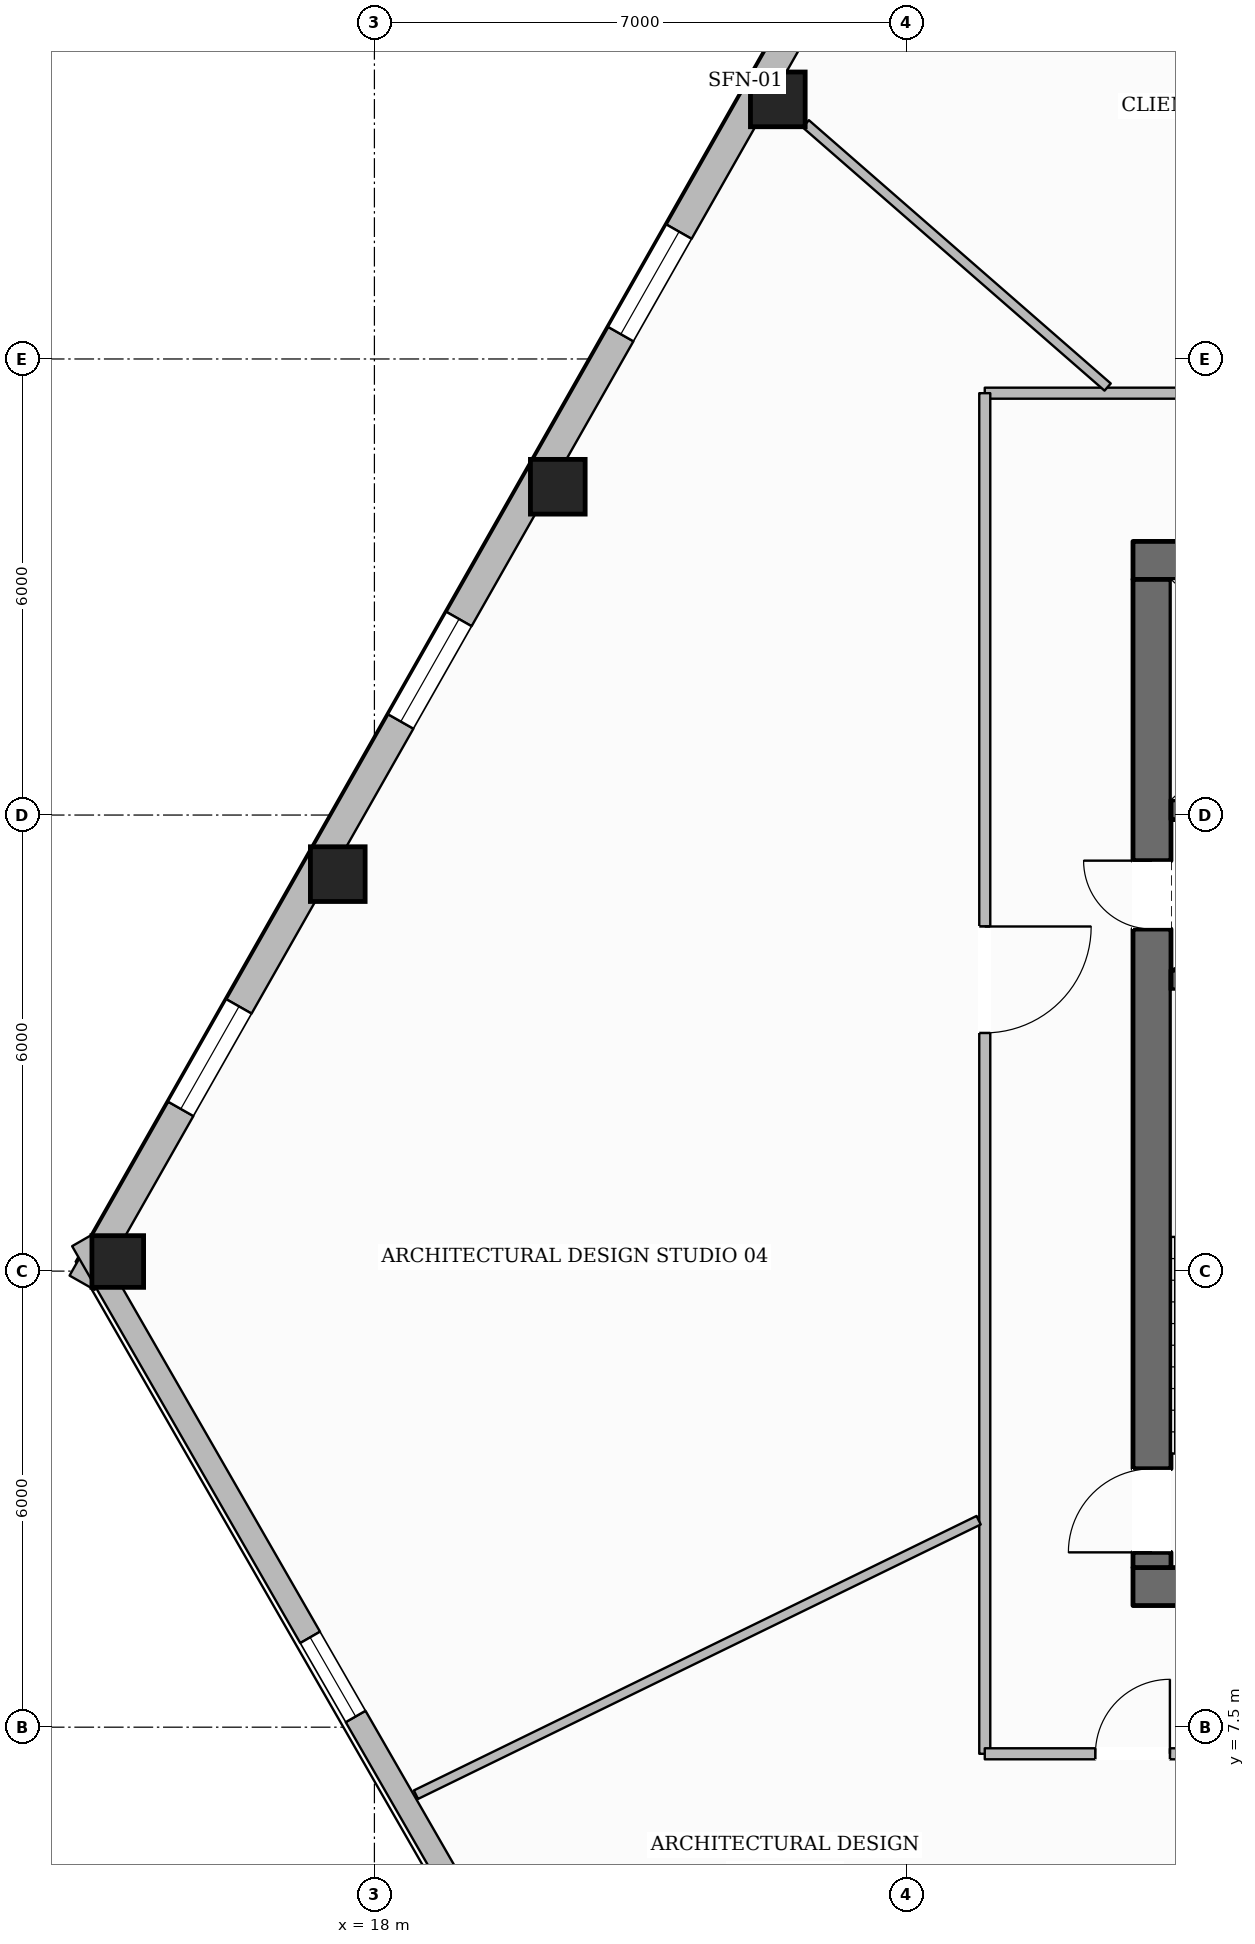
"""IFC4 building model, lengths in metres.
Left out: names, types, materials, properties, quantities, classifications, styles, units other than length and angle.
Written with IfcOpenShell. Run it as: python <this file> out.ifc"""

import sys

from ifc_helpers import new_model, si_unit, direction, frame, frame_2d, origin, origin_2d, place, context, subcontext, project, spatial, rectangle, hollow_rectangle, extrude, element, fill, save


model = new_model("IFC4")
c1 = context("Model", 3, precision=1e-05, world=origin(), true_north=direction((0.0, 1.0)))
c2 = subcontext(c1, "Body", "Model", "MODEL_VIEW")
j1 = project(units=[si_unit("LENGTHUNIT", "METRE"), si_unit("PLANEANGLEUNIT", "RADIAN")], contexts=[c1])
p1 = place(None, origin())
s1 = spatial("IfcSite", under=j1, at=p1, CompositionType="ELEMENT")
p2 = place(p1, origin())
s2 = spatial("IfcBuilding", under=s1, at=p2, CompositionType="ELEMENT")
p3 = place(p2, frame((0.0, 0.0, 104.75)))
s3 = spatial("IfcBuildingStorey", under=s2, at=p3, CompositionType="ELEMENT", Elevation=104.75)
p4 = place(p3, frame((27.98, 9.35, 0.0), z_axis=(0.0, 0.0, 1.0), x_axis=(1.0, 0.0, 0.0)))
e1 = element("IfcWall", 1, at=p4, inside=s3, PredefinedType="SOLIDWALL", context=c2, shape_type="SweptSolid", body=[
    extrude(rectangle(XDim=20.04, YDim=0.5, at=frame_2d((10.02, 0.0))), origin(), (0.0, 0.0, 1.0), 3.6),
])
p5 = place(p4, frame((10.52, 0.0, 0.0)))
e2 = element("IfcOpeningElement", 2, at=p5, cuts=e1, PredefinedType="OPENING", context=c2, shape_type="SweptSolid", body=[
    extrude(rectangle(XDim=1.4, YDim=2.2, at=frame_2d((0.7, 1.1))), frame((0.0, 0.26, 0.0), z_axis=(0.0, -1.0, 0.0), x_axis=(1.0, 0.0, 0.0)), (0.0, 0.0, 1.0), 0.52),
])
p6 = place(p3, frame((27.98, 22.85, 0.0), z_axis=(0.0, 0.0, 1.0), x_axis=(1.0, 0.0, 0.0)))
e3 = element("IfcWall", 3, at=p6, inside=s3, PredefinedType="SOLIDWALL", context=c2, shape_type="SweptSolid", body=[
    extrude(rectangle(XDim=20.04, YDim=0.5, at=frame_2d((10.02, 0.0))), origin(), (0.0, 0.0, 1.0), 3.6),
])
p7 = place(p6, frame((6.295, 0.0, 0.0)))
e4 = element("IfcOpeningElement", 4, at=p7, cuts=e3, PredefinedType="OPENING", context=c2, shape_type="SweptSolid", body=[
    extrude(rectangle(XDim=1.05, YDim=2.15, at=frame_2d((0.525, 1.075))), frame((0.0, 0.26, 0.0), z_axis=(0.0, -1.0, 0.0), x_axis=(1.0, 0.0, 0.0)), (0.0, 0.0, 1.0), 0.52),
])
p8 = place(p6, frame((12.695, 0.0, 0.0)))
e5 = element("IfcOpeningElement", 5, at=p8, cuts=e3, PredefinedType="OPENING", context=c2, shape_type="SweptSolid", body=[
    extrude(rectangle(XDim=1.05, YDim=2.15, at=frame_2d((0.525, 1.075))), frame((0.0, 0.26, 0.0), z_axis=(0.0, -1.0, 0.0), x_axis=(1.0, 0.0, 0.0)), (0.0, 0.0, 1.0), 0.52),
])
p9 = place(p3, frame((28.23, 9.6, 0.0), z_axis=(0.0, 0.0, 1.0), x_axis=(0.0, 1.0, 0.0)))
e6 = element("IfcWall", 6, at=p9, inside=s3, PredefinedType="SOLIDWALL", context=c2, shape_type="SweptSolid", body=[
    extrude(rectangle(XDim=13.0, YDim=0.5, at=frame_2d((6.5, 0.0))), origin(), (0.0, 0.0, 1.0), 3.6),
])
p10 = place(p9, frame((0.2, 0.0, 0.0)))
e7 = element("IfcOpeningElement", 7, at=p10, cuts=e6, PredefinedType="OPENING", context=c2, shape_type="SweptSolid", body=[
    extrude(rectangle(XDim=1.1, YDim=2.15, at=frame_2d((0.55, 1.075))), frame((0.0, 0.26, 0.0), z_axis=(0.0, -1.0, 0.0), x_axis=(1.0, 0.0, 0.0)), (0.0, 0.0, 1.0), 0.52),
])
p11 = place(p9, frame((8.4, 0.0, 0.0)))
e8 = element("IfcOpeningElement", 8, at=p11, cuts=e6, PredefinedType="OPENING", context=c2, shape_type="SweptSolid", body=[
    extrude(rectangle(XDim=0.9, YDim=2.1, at=frame_2d((0.45, 1.05))), frame((0.0, 0.26, 0.0), z_axis=(0.0, -1.0, 0.0), x_axis=(1.0, 0.0, 0.0)), (0.0, 0.0, 1.0), 0.52),
])
for number, where, z_axis, x_axis in (
    (9, (28.48, 17.33, 0.0), (0.0, 0.0, 1.0), (1.0, 0.0, 0.0)),
    (10, (28.48, 19.57, 0.0), (0.0, 0.0, 1.0), (1.0, 0.0, 0.0)),
):
    element("IfcWall", number, at=place(p3, frame(where, z_axis=z_axis, x_axis=x_axis)), inside=s3, PredefinedType="SHEAR", context=c2, shape_type="SweptSolid", body=[
        extrude(rectangle(XDim=3.2, YDim=0.26, at=frame_2d((1.6, 0.0))), origin(), (0.0, 0.0, 1.0), 3.6),
    ])
for number, where, z_axis, x_axis in (
    (11, (23.307, 28.915, 0.0), (0.0, 0.0, 1.0), (1.0, 0.0, 0.0)),
    (12, (20.413, 23.819, 0.0), (0.0, 0.0, 1.0), (1.0, 0.0, 0.0)),
    (13, (17.518, 18.723, 0.0), (0.0, 0.0, 1.0), (1.0, 0.0, 0.0)),
):
    element("IfcColumn", number, at=place(p3, frame(where, z_axis=z_axis, x_axis=x_axis)), inside=s3, PredefinedType="COLUMN", context=c2, shape_type="SweptSolid", body=[
        extrude(hollow_rectangle(XDim=0.72, YDim=0.72, WallThickness=0.032, at=origin_2d()), origin(), (0.0, 0.0, 1.0), 3.6),
    ])
p12 = place(p3, frame((14.624, 13.626, 0.0), z_axis=(0.0, 0.0, 1.0), x_axis=(1.0, 0.0, 0.0)))
e14 = element("IfcColumn", 14, at=p12, inside=s3, PredefinedType="COLUMN", context=c2, shape_type="SweptSolid", body=[
    extrude(hollow_rectangle(XDim=0.68, YDim=0.68, WallThickness=0.03, at=origin_2d()), origin(), (0.0, 0.0, 1.0), 3.6),
])
p13 = place(p3, frame((14.155, 13.347, 0.0), z_axis=(0.0, 0.0, 1.0), x_axis=(0.493868426836, 0.869536644986, 0.0)))
e15 = element("IfcWall", 15, at=p13, inside=s3, PredefinedType="STANDARD", context=c2, shape_type="SweptSolid", body=[
    extrude(rectangle(XDim=36.121, YDim=0.38, at=frame_2d((18.061, 0.0))), origin(), (0.0, 0.0, 1.0), 3.059),
])
p14 = place(p13, frame((31.935, 0.0, 0.65)))
e16 = element("IfcOpeningElement", 16, at=p14, cuts=e15, PredefinedType="OPENING", context=c2, shape_type="SweptSolid", body=[
    extrude(rectangle(XDim=1.55, YDim=1.75, at=frame_2d((0.775, 0.875))), frame((0.0, 0.2, 0.0), z_axis=(0.0, -1.0, 0.0), x_axis=(1.0, 0.0, 0.0)), (0.0, 0.0, 1.0), 0.4),
])
p15 = place(p13, frame((26.073, 0.0, 0.65)))
e17 = element("IfcOpeningElement", 17, at=p15, cuts=e15, PredefinedType="OPENING", context=c2, shape_type="SweptSolid", body=[
    extrude(rectangle(XDim=1.55, YDim=1.75, at=frame_2d((0.775, 0.875))), frame((0.0, 0.2, 0.0), z_axis=(0.0, -1.0, 0.0), x_axis=(1.0, 0.0, 0.0)), (0.0, 0.0, 1.0), 0.4),
])
p16 = place(p13, frame((14.352, 0.0, 0.65)))
e18 = element("IfcOpeningElement", 18, at=p16, cuts=e15, PredefinedType="OPENING", context=c2, shape_type="SweptSolid", body=[
    extrude(rectangle(XDim=1.55, YDim=1.75, at=frame_2d((0.775, 0.875))), frame((0.0, 0.2, 0.0), z_axis=(0.0, -1.0, 0.0), x_axis=(1.0, 0.0, 0.0)), (0.0, 0.0, 1.0), 0.4),
])
p17 = place(p13, frame((8.491, 0.0, 0.65)))
e19 = element("IfcOpeningElement", 19, at=p17, cuts=e15, PredefinedType="OPENING", context=c2, shape_type="SweptSolid", body=[
    extrude(rectangle(XDim=1.55, YDim=1.75, at=frame_2d((0.775, 0.875))), frame((0.0, 0.2, 0.0), z_axis=(0.0, -1.0, 0.0), x_axis=(1.0, 0.0, 0.0)), (0.0, 0.0, 1.0), 0.4),
])
p18 = place(p13, frame((2.63, 0.0, 0.65)))
e20 = element("IfcOpeningElement", 20, at=p18, cuts=e15, PredefinedType="OPENING", context=c2, shape_type="SweptSolid", body=[
    extrude(rectangle(XDim=1.55, YDim=1.75, at=frame_2d((0.775, 0.875))), frame((0.0, 0.2, 0.0), z_axis=(0.0, -1.0, 0.0), x_axis=(1.0, 0.0, 0.0)), (0.0, 0.0, 1.0), 0.4),
])
p19 = place(p3, frame((20.754, 2.419, 0.0), z_axis=(0.0, 0.0, 1.0), x_axis=(-0.49837034912, 0.866964240969, 0.0)))
e21 = element("IfcWall", 21, at=p19, inside=s3, PredefinedType="STANDARD", context=c2, shape_type="SweptSolid", body=[
    extrude(rectangle(XDim=13.246, YDim=0.3, at=frame_2d((6.623, 0.0))), origin(), (0.0, 0.0, 1.0), 3.059),
])
p20 = place(p19, frame((6.023, 0.0, 0.65)))
e22 = element("IfcOpeningElement", 22, at=p20, cuts=e21, PredefinedType="OPENING", context=c2, shape_type="SweptSolid", body=[
    extrude(rectangle(XDim=1.2, YDim=1.7, at=frame_2d((0.6, 0.85))), frame((0.0, 0.16, 0.0), z_axis=(0.0, -1.0, 0.0), x_axis=(1.0, 0.0, 0.0)), (0.0, 0.0, 1.0), 0.32),
])
p21 = place(p3, frame((49.97, 25.05, 0.0), z_axis=(0.0, 0.0, 1.0), x_axis=(-1.0, 0.0, 0.0)))
e23 = element("IfcWall", 23, at=p21, inside=s3, PredefinedType="PARTITIONING", context=c2, shape_type="SweptSolid", body=[
    extrude(rectangle(XDim=23.94, YDim=0.145, at=frame_2d((11.97, 0.0))), origin(), (0.0, 0.0, 1.0), 3.6),
])
p22 = place(p21, frame((5.824, 0.0, 0.0)))
e24 = element("IfcOpeningElement", 24, at=p22, cuts=e23, PredefinedType="OPENING", context=c2, shape_type="SweptSolid", body=[
    extrude(rectangle(XDim=1.4, YDim=2.2, at=frame_2d((0.7, 1.1))), frame((0.0, 0.083, 0.0), z_axis=(0.0, -1.0, 0.0), x_axis=(1.0, 0.0, 0.0)), (0.0, 0.0, 1.0), 0.165),
])
p23 = place(p21, frame((16.238, 0.0, 0.0)))
e25 = element("IfcOpeningElement", 25, at=p23, cuts=e23, PredefinedType="OPENING", context=c2, shape_type="SweptSolid", body=[
    extrude(rectangle(XDim=1.4, YDim=2.2, at=frame_2d((0.7, 1.1))), frame((0.0, 0.083, 0.0), z_axis=(0.0, -1.0, 0.0), x_axis=(1.0, 0.0, 0.0)), (0.0, 0.0, 1.0), 0.165),
])
p24 = place(p3, frame((26.03, 25.05, 0.0), z_axis=(0.0, 0.0, 1.0), x_axis=(0.0, -1.0, 0.0)))
e26 = element("IfcWall", 26, at=p24, inside=s3, PredefinedType="PARTITIONING", context=c2, shape_type="SweptSolid", body=[
    extrude(rectangle(XDim=17.9, YDim=0.145, at=frame_2d((8.95, 0.0))), origin(), (0.0, 0.0, 1.0), 3.288),
])
p25 = place(p24, frame((7.016, 0.0, 0.0)))
e27 = element("IfcOpeningElement", 27, at=p25, cuts=e26, PredefinedType="OPENING", context=c2, shape_type="SweptSolid", body=[
    extrude(rectangle(XDim=1.4, YDim=2.2, at=frame_2d((0.7, 1.1))), frame((0.0, 0.083, 0.0), z_axis=(0.0, -1.0, 0.0), x_axis=(1.0, 0.0, 0.0)), (0.0, 0.0, 1.0), 0.165),
])
p26 = place(p3, frame((26.03, 7.15, 0.0), z_axis=(0.0, 0.0, 1.0), x_axis=(1.0, 0.0, 0.0)))
e28 = element("IfcWall", 28, at=p26, inside=s3, PredefinedType="PARTITIONING", context=c2, shape_type="SweptSolid", body=[
    extrude(rectangle(XDim=23.94, YDim=0.145, at=frame_2d((11.97, 0.0))), origin(), (0.0, 0.0, 1.0), 3.6),
])
p27 = place(p26, frame((4.53, 0.0, 0.0)))
e29 = element("IfcOpeningElement", 29, at=p27, cuts=e28, PredefinedType="OPENING", context=c2, shape_type="SweptSolid", body=[
    extrude(rectangle(XDim=0.88, YDim=2.1, at=frame_2d((0.44, 1.05))), frame((0.0, 0.083, 0.0), z_axis=(0.0, -1.0, 0.0), x_axis=(1.0, 0.0, 0.0)), (0.0, 0.0, 1.0), 0.165),
])
p28 = place(p26, frame((7.05, 0.0, 0.0)))
e30 = element("IfcOpeningElement", 30, at=p28, cuts=e28, PredefinedType="OPENING", context=c2, shape_type="SweptSolid", body=[
    extrude(rectangle(XDim=0.88, YDim=2.1, at=frame_2d((0.44, 1.05))), frame((0.0, 0.083, 0.0), z_axis=(0.0, -1.0, 0.0), x_axis=(1.0, 0.0, 0.0)), (0.0, 0.0, 1.0), 0.165),
])
p29 = place(p26, frame((9.43, 0.0, 0.0)))
e31 = element("IfcOpeningElement", 31, at=p29, cuts=e28, PredefinedType="OPENING", context=c2, shape_type="SweptSolid", body=[
    extrude(rectangle(XDim=0.96, YDim=2.1, at=frame_2d((0.48, 1.05))), frame((0.0, 0.083, 0.0), z_axis=(0.0, -1.0, 0.0), x_axis=(1.0, 0.0, 0.0)), (0.0, 0.0, 1.0), 0.165),
])
p30 = place(p26, frame((1.456, 0.0, 0.0)))
e32 = element("IfcOpeningElement", 32, at=p30, cuts=e28, PredefinedType="OPENING", context=c2, shape_type="SweptSolid", body=[
    extrude(rectangle(XDim=0.98, YDim=2.15, at=frame_2d((0.49, 1.075))), frame((0.0, 0.083, 0.0), z_axis=(0.0, -1.0, 0.0), x_axis=(1.0, 0.0, 0.0)), (0.0, 0.0, 1.0), 0.165),
])
p31 = place(p26, frame((16.714, 0.0, 0.0)))
e33 = element("IfcOpeningElement", 33, at=p31, cuts=e28, PredefinedType="OPENING", context=c2, shape_type="SweptSolid", body=[
    extrude(rectangle(XDim=1.4, YDim=2.2, at=frame_2d((0.7, 1.1))), frame((0.0, 0.083, 0.0), z_axis=(0.0, -1.0, 0.0), x_axis=(1.0, 0.0, 0.0)), (0.0, 0.0, 1.0), 0.165),
])
p32 = place(p3, frame((27.646, 25.131, 0.0), z_axis=(0.0, 0.0, 1.0), x_axis=(-0.753603237889, 0.657329567145, 0.0)))
e34 = element("IfcWall", 34, at=p32, inside=s3, PredefinedType="PARTITIONING", context=c2, shape_type="SweptSolid", body=[
    extrude(rectangle(XDim=5.27, YDim=0.125, at=frame_2d((2.635, 0.0))), origin(), (0.0, 0.0, 1.0), 3.141),
])
p33 = place(p3, frame((25.949, 10.223, 0.0), z_axis=(0.0, 0.0, 1.0), x_axis=(-0.898788385453, -0.438382753054, 0.0)))
e35 = element("IfcWall", 35, at=p33, inside=s3, PredefinedType="PARTITIONING", context=c2, shape_type="SweptSolid", body=[
    extrude(rectangle(XDim=8.237, YDim=0.125, at=frame_2d((4.118, 0.0))), origin(), (0.0, 0.0, 1.0), 3.6),
])
p34 = place(p16, origin())
e36 = element("IfcWindow", 36, at=p34, inside=s3, PartitioningType="SINGLE_PANEL", PredefinedType="WINDOW", context=c2, shape_type="SweptSolid", body=[
    extrude(rectangle(XDim=1.55, YDim=1.75, at=frame_2d((0.775, 0.875))), frame((0.0, 0.03, 0.0), z_axis=(0.0, -1.0, 0.0), x_axis=(1.0, 0.0, 0.0)), (0.0, 0.0, 1.0), 0.06),
])
fill(e18, e36)
p35 = place(p17, origin())
e37 = element("IfcWindow", 37, at=p35, inside=s3, PartitioningType="SINGLE_PANEL", PredefinedType="WINDOW", context=c2, shape_type="SweptSolid", body=[
    extrude(rectangle(XDim=1.55, YDim=1.75, at=frame_2d((0.775, 0.875))), frame((0.0, 0.03, 0.0), z_axis=(0.0, -1.0, 0.0), x_axis=(1.0, 0.0, 0.0)), (0.0, 0.0, 1.0), 0.06),
])
fill(e19, e37)
p36 = place(p18, origin())
e38 = element("IfcWindow", 38, at=p36, inside=s3, PartitioningType="SINGLE_PANEL", PredefinedType="WINDOW", context=c2, shape_type="SweptSolid", body=[
    extrude(rectangle(XDim=1.55, YDim=1.75, at=frame_2d((0.775, 0.875))), frame((0.0, 0.03, 0.0), z_axis=(0.0, -1.0, 0.0), x_axis=(1.0, 0.0, 0.0)), (0.0, 0.0, 1.0), 0.06),
])
fill(e20, e38)
p37 = place(p20, origin())
e39 = element("IfcWindow", 39, at=p37, inside=s3, PartitioningType="SINGLE_PANEL", PredefinedType="WINDOW", context=c2, shape_type="SweptSolid", body=[
    extrude(rectangle(XDim=1.2, YDim=1.7, at=frame_2d((0.6, 0.85))), frame((0.0, 0.03, 0.0), z_axis=(0.0, -1.0, 0.0), x_axis=(1.0, 0.0, 0.0)), (0.0, 0.0, 1.0), 0.06),
])
fill(e22, e39)
p38 = place(p10, origin())
e40 = element("IfcDoor", 40, at=p38, inside=s3, OperationType="SINGLE_SWING_LEFT", PredefinedType="DOOR", context=c2, shape_type="SweptSolid", body=[
    extrude(rectangle(XDim=1.1, YDim=2.15, at=frame_2d((0.55, 1.075))), frame((0.0, 0.025, 0.0), z_axis=(0.0, -1.0, 0.0), x_axis=(1.0, 0.0, 0.0)), (0.0, 0.0, 1.0), 0.05),
])
fill(e7, e40)
p39 = place(p11, origin())
e41 = element("IfcDoor", 41, at=p39, inside=s3, OperationType="SINGLE_SWING_RIGHT", PredefinedType="DOOR", context=c2, shape_type="SweptSolid", body=[
    extrude(rectangle(XDim=0.9, YDim=2.1, at=frame_2d((0.45, 1.05))), frame((0.0, 0.025, 0.0), z_axis=(0.0, -1.0, 0.0), x_axis=(1.0, 0.0, 0.0)), (0.0, 0.0, 1.0), 0.05),
])
fill(e8, e41)
p40 = place(p25, origin())
e42 = element("IfcDoor", 42, at=p40, inside=s3, OperationType="SINGLE_SWING_LEFT", PredefinedType="DOOR", context=c2, shape_type="SweptSolid", body=[
    extrude(rectangle(XDim=1.4, YDim=2.2, at=frame_2d((0.7, 1.1))), frame((0.0, 0.025, 0.0), z_axis=(0.0, -1.0, 0.0), x_axis=(1.0, 0.0, 0.0)), (0.0, 0.0, 1.0), 0.05),
])
fill(e27, e42)
p41 = place(p30, origin())
e43 = element("IfcDoor", 43, at=p41, inside=s3, OperationType="SINGLE_SWING_RIGHT", PredefinedType="DOOR", context=c2, shape_type="SweptSolid", body=[
    extrude(rectangle(XDim=0.98, YDim=2.15, at=frame_2d((0.49, 1.075))), frame((0.0, 0.025, 0.0), z_axis=(0.0, -1.0, 0.0), x_axis=(1.0, 0.0, 0.0)), (0.0, 0.0, 1.0), 0.05),
])
fill(e32, e43)
save(model, sys.argv[1])
